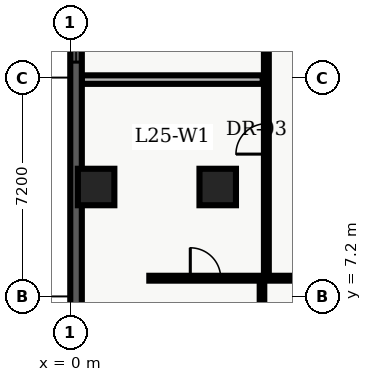
"""IFC4 building model, lengths in metres.
Left out: names, types, materials, properties, quantities, classifications, styles, units other than length and angle.
Written with IfcOpenShell. Run it as: python <this file> out.ifc"""

import sys

from ifc_helpers import new_model, entity, si_unit, converted_unit, direction, frame, origin_with_axes, origin_2d_with_axis, place, context, subcontext, project, spatial, polyline, rectangle, outline, extrude, element, fill, save


model = new_model("IFC4")
c1 = context("Model", 3, precision=1e-05, world=origin_with_axes(), true_north=direction((0.0, 1.0)))
c2 = subcontext(c1, "Body", "Model", "MODEL_VIEW")
j1 = project(units=[si_unit("LENGTHUNIT", "METRE"), converted_unit("PLANEANGLEUNIT", "DEGREE", entity("IfcPlaneAngleMeasure", 0.017), si_unit("PLANEANGLEUNIT", "RADIAN"), dimensions=[0, 0, 0, 0, 0, 0, 0])], contexts=[c1])
p1 = place(None, origin_with_axes())
s1 = spatial("IfcSite", under=j1, at=p1, CompositionType="ELEMENT")
p2 = place(p1, origin_with_axes())
s2 = spatial("IfcBuilding", under=s1, at=p2, CompositionType="ELEMENT")
p3 = place(p2, frame((0.0, 0.0, 104.7), z_axis=(0.0, 0.0, 1.0), x_axis=(1.0, 0.0, 0.0)))
s3 = spatial("IfcBuildingStorey", under=s2, at=p3, CompositionType="ELEMENT", Elevation=104.7)
for number, where, z_axis, x_axis in (
    (1, (4.85, 10.8, 0.0), (0.0, 0.0, 1.0), (1.0, 0.0, 0.0)),
    (2, (0.85, 10.8, 0.0), (0.0, 0.0, 1.0), (1.0, 0.0, 0.0)),
):
    element("IfcColumn", number, at=place(p3, frame(where, z_axis=z_axis, x_axis=x_axis)), inside=s3, PredefinedType="COLUMN", context=c2, shape_type="SweptSolid", body=[
        extrude(rectangle(XDim=1.2, YDim=1.2, at=origin_2d_with_axis()), origin_with_axes(), (0.0, 0.0, 1.0), 3.9),
    ])
p4 = place(p3, frame((2.6, 7.8, 0.0), z_axis=(0.0, 0.0, 1.0), x_axis=(1.0, 0.0, 0.0)))
e3 = element("IfcWall", 3, at=p4, inside=s3, PredefinedType="PARTITIONING", context=c2, shape_type="SweptSolid", body=[
    extrude(outline(polyline([(0.0, -0.08), (18.55, -0.08), (18.55, 0.08), (0.0, 0.08), (0.0, -0.08)])), origin_with_axes(), (0.0, 0.0, 1.0), 2.7),
])
p5 = place(p4, frame((1.848, 0.0, 0.0), z_axis=(0.0, 0.0, 1.0), x_axis=(1.0, 0.0, 0.0)))
e4 = element("IfcOpeningElement", 4, at=p5, cuts=e3, PredefinedType="OPENING", context=c2, shape_type="SweptSolid", body=[
    extrude(rectangle(XDim=1.0, YDim=0.18, at=origin_2d_with_axis()), origin_with_axes(), (0.0, 0.0, 1.0), 2.15),
])
p6 = place(p4, frame((6.253, 0.0, 0.0), z_axis=(0.0, 0.0, 1.0), x_axis=(1.0, 0.0, 0.0)))
e5 = element("IfcOpeningElement", 5, at=p6, cuts=e3, PredefinedType="OPENING", context=c2, shape_type="SweptSolid", body=[
    extrude(rectangle(XDim=1.0, YDim=0.18, at=origin_2d_with_axis()), origin_with_axes(), (0.0, 0.0, 1.0), 2.15),
])
p7 = place(p4, frame((10.845, 0.0, 0.0), z_axis=(0.0, 0.0, 1.0), x_axis=(1.0, 0.0, 0.0)))
e6 = element("IfcOpeningElement", 6, at=p7, cuts=e3, PredefinedType="OPENING", context=c2, shape_type="SweptSolid", body=[
    extrude(rectangle(XDim=1.0, YDim=0.18, at=origin_2d_with_axis()), origin_with_axes(), (0.0, 0.0, 1.0), 2.15),
])
p8 = place(p4, frame((15.694, 0.0, 0.0), z_axis=(0.0, 0.0, 1.0), x_axis=(1.0, 0.0, 0.0)))
e7 = element("IfcOpeningElement", 7, at=p8, cuts=e3, PredefinedType="OPENING", context=c2, shape_type="SweptSolid", body=[
    extrude(rectangle(XDim=1.0, YDim=0.18, at=origin_2d_with_axis()), origin_with_axes(), (0.0, 0.0, 1.0), 2.15),
])
p9 = place(p3, frame((6.45, 7.8, 0.0), z_axis=(0.0, 0.0, 1.0), x_axis=(0.0, 1.0, 0.0)))
e8 = element("IfcWall", 8, at=p9, inside=s3, PredefinedType="PARTITIONING", context=c2, shape_type="SweptSolid", body=[
    extrude(outline(polyline([(0.0, -0.08), (32.7, -0.08), (32.7, 0.08), (0.0, 0.08), (0.0, -0.08)])), origin_with_axes(), (0.0, 0.0, 1.0), 2.7),
])
p10 = place(p9, frame((4.582, 0.0, 0.0), z_axis=(0.0, 0.0, 1.0), x_axis=(1.0, 0.0, 0.0)))
e9 = element("IfcOpeningElement", 9, at=p10, cuts=e8, PredefinedType="OPENING", context=c2, shape_type="SweptSolid", body=[
    extrude(rectangle(XDim=1.0, YDim=0.18, at=origin_2d_with_axis()), origin_with_axes(), (0.0, 0.0, 1.0), 2.15),
])
p11 = place(p9, frame((10.304, 0.0, 0.0), z_axis=(0.0, 0.0, 1.0), x_axis=(1.0, 0.0, 0.0)))
e10 = element("IfcOpeningElement", 10, at=p11, cuts=e8, PredefinedType="OPENING", context=c2, shape_type="SweptSolid", body=[
    extrude(rectangle(XDim=1.0, YDim=0.18, at=origin_2d_with_axis()), origin_with_axes(), (0.0, 0.0, 1.0), 2.15),
])
p12 = place(p9, frame((18.512, 0.0, 0.0), z_axis=(0.0, 0.0, 1.0), x_axis=(1.0, 0.0, 0.0)))
e11 = element("IfcOpeningElement", 11, at=p12, cuts=e8, PredefinedType="OPENING", context=c2, shape_type="SweptSolid", body=[
    extrude(rectangle(XDim=1.0, YDim=0.18, at=origin_2d_with_axis()), origin_with_axes(), (0.0, 0.0, 1.0), 2.15),
])
p13 = place(p9, frame((25.142, 0.0, 0.0), z_axis=(0.0, 0.0, 1.0), x_axis=(1.0, 0.0, 0.0)))
e12 = element("IfcOpeningElement", 12, at=p13, cuts=e8, PredefinedType="OPENING", context=c2, shape_type="SweptSolid", body=[
    extrude(rectangle(XDim=1.0, YDim=0.18, at=origin_2d_with_axis()), origin_with_axes(), (0.0, 0.0, 1.0), 2.15),
])
p14 = place(p9, frame((31.602, 0.0, 0.0), z_axis=(0.0, 0.0, 1.0), x_axis=(1.0, 0.0, 0.0)))
e13 = element("IfcOpeningElement", 13, at=p14, cuts=e8, PredefinedType="OPENING", context=c2, shape_type="SweptSolid", body=[
    extrude(rectangle(XDim=1.0, YDim=0.18, at=origin_2d_with_axis()), origin_with_axes(), (0.0, 0.0, 1.0), 2.15),
])
p15 = place(p3, frame((0.375, 14.333, 0.0), z_axis=(0.0, 0.0, 1.0), x_axis=(1.0, 0.0, 0.0)))
e14 = element("IfcWall", 14, at=p15, inside=s3, PredefinedType="PARTITIONING", context=c2, shape_type="SweptSolid", body=[
    extrude(outline(polyline([(0.0, -0.14), (5.955, -0.14), (5.955, 0.14), (0.0, 0.14), (0.0, -0.14)])), origin_with_axes(), (0.0, 0.0, 1.0), 2.7),
])
p16 = place(p3, frame((6.306, 0.36, 0.0), z_axis=(0.0, 0.0, 1.0), x_axis=(0.0, 1.0, 0.0)))
e15 = element("IfcWall", 15, at=p16, inside=s3, PredefinedType="PARTITIONING", context=c2, shape_type="SweptSolid", body=[
    extrude(outline(polyline([(0.0, -0.075), (7.34, -0.075), (7.34, 0.075), (0.0, 0.075), (0.0, -0.075)])), origin_with_axes(), (0.0, 0.0, 1.0), 2.7),
])
p17 = place(p3, frame((0.19, 2.78, 0.0), z_axis=(0.0, 0.0, 1.0), x_axis=(0.0, 1.0, 0.0)))
e16 = element("IfcWall", 16, at=p17, inside=s3, PredefinedType="SOLIDWALL", context=c2, shape_type="SweptSolid", body=[
    extrude(outline(polyline([(0.0, -0.19), (43.42, -0.19), (43.42, 0.19), (0.0, 0.19), (0.0, -0.19)])), origin_with_axes(), (0.0, 0.0, 1.0), 3.66),
])
p18 = place(p17, frame((2.946, 0.0, 0.45), z_axis=(0.0, 0.0, 1.0), x_axis=(1.0, 0.0, 0.0)))
e17 = element("IfcOpeningElement", 17, at=p18, cuts=e16, PredefinedType="OPENING", context=c2, shape_type="SweptSolid", body=[
    extrude(rectangle(XDim=2.1, YDim=0.4, at=origin_2d_with_axis()), origin_with_axes(), (0.0, 0.0, 1.0), 2.2),
])
p19 = place(p17, frame((13.178, 0.0, 0.45), z_axis=(0.0, 0.0, 1.0), x_axis=(1.0, 0.0, 0.0)))
e18 = element("IfcOpeningElement", 18, at=p19, cuts=e16, PredefinedType="OPENING", context=c2, shape_type="SweptSolid", body=[
    extrude(rectangle(XDim=2.1, YDim=0.4, at=origin_2d_with_axis()), origin_with_axes(), (0.0, 0.0, 1.0), 2.2),
])
p20 = place(p17, frame((17.469, 0.0, 0.45), z_axis=(0.0, 0.0, 1.0), x_axis=(1.0, 0.0, 0.0)))
e19 = element("IfcOpeningElement", 19, at=p20, cuts=e16, PredefinedType="OPENING", context=c2, shape_type="SweptSolid", body=[
    extrude(rectangle(XDim=2.1, YDim=0.4, at=origin_2d_with_axis()), origin_with_axes(), (0.0, 0.0, 1.0), 2.2),
])
p21 = place(p17, frame((21.71, 0.0, 0.45), z_axis=(0.0, 0.0, 1.0), x_axis=(1.0, 0.0, 0.0)))
e20 = element("IfcOpeningElement", 20, at=p21, cuts=e16, PredefinedType="OPENING", context=c2, shape_type="SweptSolid", body=[
    extrude(rectangle(XDim=2.1, YDim=0.4, at=origin_2d_with_axis()), origin_with_axes(), (0.0, 0.0, 1.0), 2.2),
])
p22 = place(p17, frame((26.401, 0.0, 0.45), z_axis=(0.0, 0.0, 1.0), x_axis=(1.0, 0.0, 0.0)))
e21 = element("IfcOpeningElement", 21, at=p22, cuts=e16, PredefinedType="OPENING", context=c2, shape_type="SweptSolid", body=[
    extrude(rectangle(XDim=2.1, YDim=0.4, at=origin_2d_with_axis()), origin_with_axes(), (0.0, 0.0, 1.0), 2.2),
])
p23 = place(p17, frame((30.642, 0.0, 0.45), z_axis=(0.0, 0.0, 1.0), x_axis=(1.0, 0.0, 0.0)))
e22 = element("IfcOpeningElement", 22, at=p23, cuts=e16, PredefinedType="OPENING", context=c2, shape_type="SweptSolid", body=[
    extrude(rectangle(XDim=2.1, YDim=0.4, at=origin_2d_with_axis()), origin_with_axes(), (0.0, 0.0, 1.0), 2.2),
])
p24 = place(p17, frame((40.024, 0.0, 0.45), z_axis=(0.0, 0.0, 1.0), x_axis=(1.0, 0.0, 0.0)))
e23 = element("IfcOpeningElement", 23, at=p24, cuts=e16, PredefinedType="OPENING", context=c2, shape_type="SweptSolid", body=[
    extrude(rectangle(XDim=2.1, YDim=0.4, at=origin_2d_with_axis()), origin_with_axes(), (0.0, 0.0, 1.0), 2.2),
])
p25 = place(p9, frame((4.582, 0.0, 0.0), z_axis=(0.0, 0.0, 1.0), x_axis=(1.0, 0.0, 0.0)))
e24 = element("IfcDoor", 24, at=p25, inside=s3, OperationType="SINGLE_SWING_LEFT", PredefinedType="DOOR", context=c2, shape_type="SweptSolid", body=[
    extrude(rectangle(XDim=1.0, YDim=0.09, at=origin_2d_with_axis()), origin_with_axes(), (0.0, 0.0, 1.0), 2.15),
])
fill(e9, e24)
p26 = place(p4, frame((1.848, 0.0, 0.0), z_axis=(0.0, 0.0, 1.0), x_axis=(1.0, 0.0, 0.0)))
e25 = element("IfcDoor", 25, at=p26, inside=s3, OperationType="SINGLE_SWING_LEFT", PredefinedType="DOOR", context=c2, shape_type="SweptSolid", body=[
    extrude(rectangle(XDim=1.0, YDim=0.09, at=origin_2d_with_axis()), origin_with_axes(), (0.0, 0.0, 1.0), 2.15),
])
fill(e4, e25)
p27 = place(p17, frame((13.178, 0.0, 0.45), z_axis=(0.0, 0.0, 1.0), x_axis=(1.0, 0.0, 0.0)))
e26 = element("IfcWindow", 26, at=p27, inside=s3, PredefinedType="WINDOW", context=c2, shape_type="SweptSolid", body=[
    extrude(rectangle(XDim=2.1, YDim=0.09, at=origin_2d_with_axis()), origin_with_axes(), (0.0, 0.0, 1.0), 2.2),
])
fill(e18, e26)
save(model, sys.argv[1])
